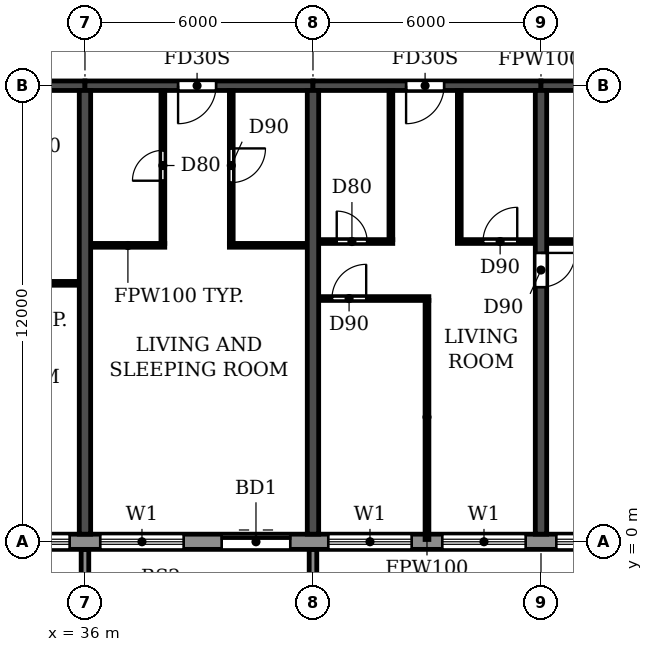
"""IFC4 building model, lengths in metres.
Left out: names, types, materials, properties, quantities, classifications, styles, units other than length and angle.
Written with IfcOpenShell. Run it as: python <this file> out.ifc"""

import sys

from ifc_helpers import new_model, si_unit, direction, frame, frame_2d, origin, place, context, subcontext, project, spatial, polyline, rectangle, outline, extrude, source, transform, mapped, element, fill, save


model = new_model("IFC4")
c1 = context("Model", 3, precision=1e-05, world=origin(), true_north=direction((0.0, 1.0)))
c2 = subcontext(c1, "Body", "Model", "MODEL_VIEW")
j1 = project(units=[si_unit("LENGTHUNIT", "METRE"), si_unit("PLANEANGLEUNIT", "RADIAN")], contexts=[c1])
p1 = place(None, origin())
s1 = spatial("IfcSite", under=j1, at=p1, CompositionType="ELEMENT")
p2 = place(p1, origin())
s2 = spatial("IfcBuilding", under=s1, at=p2, CompositionType="ELEMENT")
p3 = place(p2, frame((0.0, 0.0, 162.0)))
s3 = spatial("IfcBuildingStorey", under=s2, at=p3, CompositionType="ELEMENT", Elevation=162.0)
for number, where, z_axis, x_axis in (
    (1, (36.0, 0.2, 0.0), (0.0, 0.0, 1.0), (0.0, 1.0, 0.0)),
    (2, (42.0, 0.2, 0.0), (0.0, 0.0, 1.0), (0.0, 1.0, 0.0)),
):
    element("IfcWall", number, at=place(p3, frame(where, z_axis=z_axis, x_axis=x_axis)), inside=s3, PredefinedType="SHEAR", context=c2, shape_type="SweptSolid", body=[
        extrude(rectangle(XDim=11.675, YDim=0.3, at=frame_2d((5.837, 0.0))), origin(), (0.0, 0.0, 1.0), 2.95),
    ])
p4 = place(p3, frame((48.0, 0.2, 0.0), z_axis=(0.0, 0.0, 1.0), x_axis=(0.0, 1.0, 0.0)))
e3 = element("IfcWall", 3, at=p4, inside=s3, PredefinedType="SHEAR", context=c2, shape_type="SweptSolid", body=[
    extrude(rectangle(XDim=11.675, YDim=0.3, at=frame_2d((5.837, 0.0))), origin(), (0.0, 0.0, 1.0), 2.95),
])
p5 = place(p4, frame((6.5, 0.0, 0.0)))
e4 = element("IfcOpeningElement", 4, at=p5, cuts=e3, PredefinedType="OPENING", context=c2, shape_type="SweptSolid", body=[
    extrude(rectangle(XDim=0.9, YDim=2.1, at=frame_2d((0.45, 1.05))), frame((0.0, 0.16, 0.0), z_axis=(0.0, -1.0, 0.0), x_axis=(1.0, 0.0, 0.0)), (0.0, 0.0, 1.0), 0.32),
])
p6 = place(p3, frame((30.0, 12.0, 0.0), z_axis=(0.0, 0.0, 1.0), x_axis=(1.0, 0.0, 0.0)))
e5 = element("IfcWall", 5, at=p6, inside=s3, PredefinedType="SHEAR", context=c2, shape_type="SweptSolid", body=[
    extrude(rectangle(XDim=6.0, YDim=0.25, at=frame_2d((3.0, 0.0))), origin(), (0.0, 0.0, 1.0), 2.35),
])
p7 = place(p6, frame((2.45, 0.0, 0.0)))
e6 = element("IfcOpeningElement", 6, at=p7, cuts=e5, PredefinedType="OPENING", context=c2, shape_type="SweptSolid", body=[
    extrude(rectangle(XDim=1.0, YDim=2.1, at=frame_2d((0.5, 1.05))), frame((0.0, 0.135, 0.0), z_axis=(0.0, -1.0, 0.0), x_axis=(1.0, 0.0, 0.0)), (0.0, 0.0, 1.0), 0.27),
])
p8 = place(p3, frame((36.0, 12.0, 0.0), z_axis=(0.0, 0.0, 1.0), x_axis=(1.0, 0.0, 0.0)))
e7 = element("IfcWall", 7, at=p8, inside=s3, PredefinedType="SHEAR", context=c2, shape_type="SweptSolid", body=[
    extrude(rectangle(XDim=6.0, YDim=0.25, at=frame_2d((3.0, 0.0))), origin(), (0.0, 0.0, 1.0), 2.35),
])
p9 = place(p8, frame((2.45, 0.0, 0.0)))
e8 = element("IfcOpeningElement", 8, at=p9, cuts=e7, PredefinedType="OPENING", context=c2, shape_type="SweptSolid", body=[
    extrude(rectangle(XDim=1.0, YDim=2.1, at=frame_2d((0.5, 1.05))), frame((0.0, 0.135, 0.0), z_axis=(0.0, -1.0, 0.0), x_axis=(1.0, 0.0, 0.0)), (0.0, 0.0, 1.0), 0.27),
])
p10 = place(p3, frame((42.0, 12.0, 0.0), z_axis=(0.0, 0.0, 1.0), x_axis=(1.0, 0.0, 0.0)))
e9 = element("IfcWall", 9, at=p10, inside=s3, PredefinedType="SHEAR", context=c2, shape_type="SweptSolid", body=[
    extrude(rectangle(XDim=6.0, YDim=0.25, at=frame_2d((3.0, 0.0))), origin(), (0.0, 0.0, 1.0), 2.35),
])
p11 = place(p10, frame((2.45, 0.0, 0.0)))
e10 = element("IfcOpeningElement", 10, at=p11, cuts=e9, PredefinedType="OPENING", context=c2, shape_type="SweptSolid", body=[
    extrude(rectangle(XDim=1.0, YDim=2.1, at=frame_2d((0.5, 1.05))), frame((0.0, 0.135, 0.0), z_axis=(0.0, -1.0, 0.0), x_axis=(1.0, 0.0, 0.0)), (0.0, 0.0, 1.0), 0.27),
])
p12 = place(p3, frame((48.0, 12.0, 0.0), z_axis=(0.0, 0.0, 1.0), x_axis=(1.0, 0.0, 0.0)))
e11 = element("IfcWall", 11, at=p12, inside=s3, PredefinedType="SHEAR", context=c2, shape_type="SweptSolid", body=[
    extrude(rectangle(XDim=6.0, YDim=0.25, at=frame_2d((3.0, 0.0))), origin(), (0.0, 0.0, 1.0), 2.35),
])
p13 = place(p3, frame((22.683, 0.0, 0.0), z_axis=(0.0, 0.0, 1.0), x_axis=(1.0, 0.0, 0.0)))
e12 = element("IfcWall", 12, at=p13, inside=s3, PredefinedType="STANDARD", context=c2, shape_type="SweptSolid", body=[
    extrude(rectangle(XDim=56.634, YDim=0.4, at=frame_2d((28.317, 0.0))), origin(), (0.0, 0.0, 1.0), 2.95),
])
p14 = place(p13, frame((1.717, 0.0, 0.9)))
e13 = element("IfcOpeningElement", 13, at=p14, cuts=e12, PredefinedType="OPENING", context=c2, shape_type="SweptSolid", body=[
    extrude(rectangle(XDim=2.2, YDim=1.5, at=frame_2d((1.1, 0.75))), frame((0.0, 0.21, 0.0), z_axis=(0.0, -1.0, 0.0), x_axis=(1.0, 0.0, 0.0)), (0.0, 0.0, 1.0), 0.42),
])
p15 = place(p13, frame((4.917, 0.0, 0.0)))
e14 = element("IfcOpeningElement", 14, at=p15, cuts=e12, PredefinedType="OPENING", context=c2, shape_type="SweptSolid", body=[
    extrude(rectangle(XDim=1.8, YDim=2.4, at=frame_2d((0.9, 1.2))), frame((0.0, 0.21, 0.0), z_axis=(0.0, -1.0, 0.0), x_axis=(1.0, 0.0, 0.0)), (0.0, 0.0, 1.0), 0.42),
])
p16 = place(p13, frame((7.717, 0.0, 0.9)))
e15 = element("IfcOpeningElement", 15, at=p16, cuts=e12, PredefinedType="OPENING", context=c2, shape_type="SweptSolid", body=[
    extrude(rectangle(XDim=2.2, YDim=1.5, at=frame_2d((1.1, 0.75))), frame((0.0, 0.21, 0.0), z_axis=(0.0, -1.0, 0.0), x_axis=(1.0, 0.0, 0.0)), (0.0, 0.0, 1.0), 0.42),
])
p17 = place(p13, frame((10.717, 0.0, 0.9)))
e16 = element("IfcOpeningElement", 16, at=p17, cuts=e12, PredefinedType="OPENING", context=c2, shape_type="SweptSolid", body=[
    extrude(rectangle(XDim=2.2, YDim=1.5, at=frame_2d((1.1, 0.75))), frame((0.0, 0.21, 0.0), z_axis=(0.0, -1.0, 0.0), x_axis=(1.0, 0.0, 0.0)), (0.0, 0.0, 1.0), 0.42),
])
p18 = place(p13, frame((13.717, 0.0, 0.9)))
e17 = element("IfcOpeningElement", 17, at=p18, cuts=e12, PredefinedType="OPENING", context=c2, shape_type="SweptSolid", body=[
    extrude(rectangle(XDim=2.2, YDim=1.5, at=frame_2d((1.1, 0.75))), frame((0.0, 0.21, 0.0), z_axis=(0.0, -1.0, 0.0), x_axis=(1.0, 0.0, 0.0)), (0.0, 0.0, 1.0), 0.42),
])
p19 = place(p13, frame((16.917, 0.0, 0.0)))
e18 = element("IfcOpeningElement", 18, at=p19, cuts=e12, PredefinedType="OPENING", context=c2, shape_type="SweptSolid", body=[
    extrude(rectangle(XDim=1.8, YDim=2.4, at=frame_2d((0.9, 1.2))), frame((0.0, 0.21, 0.0), z_axis=(0.0, -1.0, 0.0), x_axis=(1.0, 0.0, 0.0)), (0.0, 0.0, 1.0), 0.42),
])
p20 = place(p13, frame((19.717, 0.0, 0.9)))
e19 = element("IfcOpeningElement", 19, at=p20, cuts=e12, PredefinedType="OPENING", context=c2, shape_type="SweptSolid", body=[
    extrude(rectangle(XDim=2.2, YDim=1.5, at=frame_2d((1.1, 0.75))), frame((0.0, 0.21, 0.0), z_axis=(0.0, -1.0, 0.0), x_axis=(1.0, 0.0, 0.0)), (0.0, 0.0, 1.0), 0.42),
])
p21 = place(p13, frame((22.717, 0.0, 0.9)))
e20 = element("IfcOpeningElement", 20, at=p21, cuts=e12, PredefinedType="OPENING", context=c2, shape_type="SweptSolid", body=[
    extrude(rectangle(XDim=2.2, YDim=1.5, at=frame_2d((1.1, 0.75))), frame((0.0, 0.21, 0.0), z_axis=(0.0, -1.0, 0.0), x_axis=(1.0, 0.0, 0.0)), (0.0, 0.0, 1.0), 0.42),
])
p22 = place(p13, frame((25.717, 0.0, 0.9)))
e21 = element("IfcOpeningElement", 21, at=p22, cuts=e12, PredefinedType="OPENING", context=c2, shape_type="SweptSolid", body=[
    extrude(rectangle(XDim=2.2, YDim=1.5, at=frame_2d((1.1, 0.75))), frame((0.0, 0.21, 0.0), z_axis=(0.0, -1.0, 0.0), x_axis=(1.0, 0.0, 0.0)), (0.0, 0.0, 1.0), 0.42),
])
p23 = place(p13, frame((28.717, 0.0, 0.9)))
e22 = element("IfcOpeningElement", 22, at=p23, cuts=e12, PredefinedType="OPENING", context=c2, shape_type="SweptSolid", body=[
    extrude(rectangle(XDim=2.2, YDim=1.5, at=frame_2d((1.1, 0.75))), frame((0.0, 0.21, 0.0), z_axis=(0.0, -1.0, 0.0), x_axis=(1.0, 0.0, 0.0)), (0.0, 0.0, 1.0), 0.42),
])
p24 = place(p13, frame((31.717, 0.0, 0.9)))
e23 = element("IfcOpeningElement", 23, at=p24, cuts=e12, PredefinedType="OPENING", context=c2, shape_type="SweptSolid", body=[
    extrude(rectangle(XDim=2.2, YDim=1.5, at=frame_2d((1.1, 0.75))), frame((0.0, 0.21, 0.0), z_axis=(0.0, -1.0, 0.0), x_axis=(1.0, 0.0, 0.0)), (0.0, 0.0, 1.0), 0.42),
])
p25 = place(p13, frame((34.717, 0.0, 0.9)))
e24 = element("IfcOpeningElement", 24, at=p25, cuts=e12, PredefinedType="OPENING", context=c2, shape_type="SweptSolid", body=[
    extrude(rectangle(XDim=2.2, YDim=1.5, at=frame_2d((1.1, 0.75))), frame((0.0, 0.21, 0.0), z_axis=(0.0, -1.0, 0.0), x_axis=(1.0, 0.0, 0.0)), (0.0, 0.0, 1.0), 0.42),
])
p26 = place(p13, frame((37.717, 0.0, 0.9)))
e25 = element("IfcOpeningElement", 25, at=p26, cuts=e12, PredefinedType="OPENING", context=c2, shape_type="SweptSolid", body=[
    extrude(rectangle(XDim=2.2, YDim=1.5, at=frame_2d((1.1, 0.75))), frame((0.0, 0.21, 0.0), z_axis=(0.0, -1.0, 0.0), x_axis=(1.0, 0.0, 0.0)), (0.0, 0.0, 1.0), 0.42),
])
p27 = place(p13, frame((40.717, 0.0, 0.9)))
e26 = element("IfcOpeningElement", 26, at=p27, cuts=e12, PredefinedType="OPENING", context=c2, shape_type="SweptSolid", body=[
    extrude(rectangle(XDim=2.2, YDim=1.5, at=frame_2d((1.1, 0.75))), frame((0.0, 0.21, 0.0), z_axis=(0.0, -1.0, 0.0), x_axis=(1.0, 0.0, 0.0)), (0.0, 0.0, 1.0), 0.42),
])
p28 = place(p13, frame((43.717, 0.0, 0.9)))
e27 = element("IfcOpeningElement", 27, at=p28, cuts=e12, PredefinedType="OPENING", context=c2, shape_type="SweptSolid", body=[
    extrude(rectangle(XDim=2.2, YDim=1.5, at=frame_2d((1.1, 0.75))), frame((0.0, 0.21, 0.0), z_axis=(0.0, -1.0, 0.0), x_axis=(1.0, 0.0, 0.0)), (0.0, 0.0, 1.0), 0.42),
])
p29 = place(p13, frame((46.717, 0.0, 0.9)))
e28 = element("IfcOpeningElement", 28, at=p29, cuts=e12, PredefinedType="OPENING", context=c2, shape_type="SweptSolid", body=[
    extrude(rectangle(XDim=2.2, YDim=1.5, at=frame_2d((1.1, 0.75))), frame((0.0, 0.21, 0.0), z_axis=(0.0, -1.0, 0.0), x_axis=(1.0, 0.0, 0.0)), (0.0, 0.0, 1.0), 0.42),
])
p30 = place(p13, frame((49.917, 0.0, 0.0)))
e29 = element("IfcOpeningElement", 29, at=p30, cuts=e12, PredefinedType="OPENING", context=c2, shape_type="SweptSolid", body=[
    extrude(rectangle(XDim=1.8, YDim=2.4, at=frame_2d((0.9, 1.2))), frame((0.0, 0.21, 0.0), z_axis=(0.0, -1.0, 0.0), x_axis=(1.0, 0.0, 0.0)), (0.0, 0.0, 1.0), 0.42),
])
p31 = place(p13, frame((52.717, 0.0, 0.9)))
e30 = element("IfcOpeningElement", 30, at=p31, cuts=e12, PredefinedType="OPENING", context=c2, shape_type="SweptSolid", body=[
    extrude(rectangle(XDim=2.2, YDim=1.5, at=frame_2d((1.1, 0.75))), frame((0.0, 0.21, 0.0), z_axis=(0.0, -1.0, 0.0), x_axis=(1.0, 0.0, 0.0)), (0.0, 0.0, 1.0), 0.42),
])
m1 = source(origin(), c2, "Body", "SweptSolid", [
    extrude(outline(polyline([(0.0, 0.0), (0.2, 0.0), (0.2, 1.65), (0.0, 1.65), (0.0, 0.0)])), origin(), (0.0, 0.0, 1.0), 3.1),
])
for number, where in (
    (31, (35.9, -1.85, 0.0)),
    (32, (41.9, -1.85, 0.0)),
):
    element("IfcWall", number, at=place(p3, frame(where)), inside=s3, PredefinedType="STANDARD", context=c2, shape_type="MappedRepresentation", body=[
        mapped(m1, transform((0.0, 0.0, 0.0))),
    ])
p32 = place(p3, frame((42.16, 6.4, 0.0), z_axis=(0.0, 0.0, 1.0), x_axis=(1.0, 0.0, 0.0)))
e33 = element("IfcWall", 33, at=p32, inside=s3, PredefinedType="PARTITIONING", context=c2, shape_type="SweptSolid", body=[
    extrude(rectangle(XDim=2.89, YDim=0.1, at=frame_2d((1.445, 0.0))), origin(), (0.0, 0.0, 1.0), 2.95),
])
p33 = place(p32, frame((0.34, 0.0, 0.0)))
e34 = element("IfcOpeningElement", 34, at=p33, cuts=e33, PredefinedType="OPENING", context=c2, shape_type="SweptSolid", body=[
    extrude(rectangle(XDim=0.9, YDim=2.1, at=frame_2d((0.45, 1.05))), frame((0.0, 0.06, 0.0), z_axis=(0.0, -1.0, 0.0), x_axis=(1.0, 0.0, 0.0)), (0.0, 0.0, 1.0), 0.12),
])
p34 = place(p3, frame((33.8, 6.8, 0.0), z_axis=(0.0, 0.0, 1.0), x_axis=(1.0, 0.0, 0.0)))
e35 = element("IfcWall", 35, at=p34, inside=s3, PredefinedType="PARTITIONING", context=c2, shape_type="SweptSolid", body=[
    extrude(rectangle(XDim=2.04, YDim=0.1, at=frame_2d((1.02, 0.0))), origin(), (0.0, 0.0, 1.0), 2.95),
])
p35 = place(p3, frame((36.16, 7.8, 0.0), z_axis=(0.0, 0.0, 1.0), x_axis=(1.0, 0.0, 0.0)))
e36 = element("IfcWall", 36, at=p35, inside=s3, PredefinedType="PARTITIONING", context=c2, shape_type="SweptSolid", body=[
    extrude(rectangle(XDim=1.94, YDim=0.1, at=frame_2d((0.97, 0.0))), origin(), (0.0, 0.0, 1.0), 2.95),
])
p36 = place(p3, frame((39.8, 7.8, 0.0), z_axis=(0.0, 0.0, 1.0), x_axis=(1.0, 0.0, 0.0)))
e37 = element("IfcWall", 37, at=p36, inside=s3, PredefinedType="PARTITIONING", context=c2, shape_type="SweptSolid", body=[
    extrude(rectangle(XDim=2.04, YDim=0.1, at=frame_2d((1.02, 0.0))), origin(), (0.0, 0.0, 1.0), 2.95),
])
p37 = place(p3, frame((42.16, 7.9, 0.0), z_axis=(0.0, 0.0, 1.0), x_axis=(1.0, 0.0, 0.0)))
e38 = element("IfcWall", 38, at=p37, inside=s3, PredefinedType="PARTITIONING", context=c2, shape_type="SweptSolid", body=[
    extrude(rectangle(XDim=1.94, YDim=0.1, at=frame_2d((0.97, 0.0))), origin(), (0.0, 0.0, 1.0), 2.95),
])
p38 = place(p37, frame((0.465, 0.0, 0.0)))
e39 = element("IfcOpeningElement", 39, at=p38, cuts=e38, PredefinedType="OPENING", context=c2, shape_type="SweptSolid", body=[
    extrude(rectangle(XDim=0.8, YDim=2.1, at=frame_2d((0.4, 1.05))), frame((0.0, 0.06, 0.0), z_axis=(0.0, -1.0, 0.0), x_axis=(1.0, 0.0, 0.0)), (0.0, 0.0, 1.0), 0.12),
])
p39 = place(p3, frame((45.8, 7.9, 0.0), z_axis=(0.0, 0.0, 1.0), x_axis=(1.0, 0.0, 0.0)))
e40 = element("IfcWall", 40, at=p39, inside=s3, PredefinedType="PARTITIONING", context=c2, shape_type="SweptSolid", body=[
    extrude(rectangle(XDim=2.04, YDim=0.1, at=frame_2d((1.02, 0.0))), origin(), (0.0, 0.0, 1.0), 2.95),
])
p40 = place(p39, frame((0.675, 0.0, 0.0)))
e41 = element("IfcOpeningElement", 41, at=p40, cuts=e40, PredefinedType="OPENING", context=c2, shape_type="SweptSolid", body=[
    extrude(rectangle(XDim=0.9, YDim=2.1, at=frame_2d((0.45, 1.05))), frame((0.0, 0.06, 0.0), z_axis=(0.0, -1.0, 0.0), x_axis=(1.0, 0.0, 0.0)), (0.0, 0.0, 1.0), 0.12),
])
p41 = place(p3, frame((48.16, 7.9, 0.0), z_axis=(0.0, 0.0, 1.0), x_axis=(1.0, 0.0, 0.0)))
e42 = element("IfcWall", 42, at=p41, inside=s3, PredefinedType="PARTITIONING", context=c2, shape_type="SweptSolid", body=[
    extrude(rectangle(XDim=2.74, YDim=0.1, at=frame_2d((1.37, 0.0))), origin(), (0.0, 0.0, 1.0), 2.95),
])
p42 = place(p41, frame((0.94, 0.0, 0.0)))
e43 = element("IfcOpeningElement", 43, at=p42, cuts=e42, PredefinedType="OPENING", context=c2, shape_type="SweptSolid", body=[
    extrude(rectangle(XDim=0.8, YDim=2.1, at=frame_2d((0.4, 1.05))), frame((0.0, 0.06, 0.0), z_axis=(0.0, -1.0, 0.0), x_axis=(1.0, 0.0, 0.0)), (0.0, 0.0, 1.0), 0.12),
])
p43 = place(p3, frame((38.05, 7.85, 0.0), z_axis=(0.0, 0.0, 1.0), x_axis=(0.0, 1.0, 0.0)))
e44 = element("IfcWall", 44, at=p43, inside=s3, PredefinedType="PARTITIONING", context=c2, shape_type="SweptSolid", body=[
    extrude(rectangle(XDim=4.015, YDim=0.1, at=frame_2d((2.007, 0.0))), origin(), (0.0, 0.0, 1.0), 2.95),
])
p44 = place(p43, frame((1.65, 0.0, 0.0)))
e45 = element("IfcOpeningElement", 45, at=p44, cuts=e44, PredefinedType="OPENING", context=c2, shape_type="SweptSolid", body=[
    extrude(rectangle(XDim=0.8, YDim=2.1, at=frame_2d((0.4, 1.05))), frame((0.0, 0.06, 0.0), z_axis=(0.0, -1.0, 0.0), x_axis=(1.0, 0.0, 0.0)), (0.0, 0.0, 1.0), 0.12),
])
p45 = place(p3, frame((39.85, 7.85, 0.0), z_axis=(0.0, 0.0, 1.0), x_axis=(0.0, 1.0, 0.0)))
e46 = element("IfcWall", 46, at=p45, inside=s3, PredefinedType="PARTITIONING", context=c2, shape_type="SweptSolid", body=[
    extrude(rectangle(XDim=4.015, YDim=0.1, at=frame_2d((2.007, 0.0))), origin(), (0.0, 0.0, 1.0), 2.95),
])
p46 = place(p45, frame((1.6, 0.0, 0.0)))
e47 = element("IfcOpeningElement", 47, at=p46, cuts=e46, PredefinedType="OPENING", context=c2, shape_type="SweptSolid", body=[
    extrude(rectangle(XDim=0.9, YDim=2.1, at=frame_2d((0.45, 1.05))), frame((0.0, 0.06, 0.0), z_axis=(0.0, -1.0, 0.0), x_axis=(1.0, 0.0, 0.0)), (0.0, 0.0, 1.0), 0.12),
])
p47 = place(p3, frame((44.05, 7.95, 0.0), z_axis=(0.0, 0.0, 1.0), x_axis=(0.0, 1.0, 0.0)))
e48 = element("IfcWall", 48, at=p47, inside=s3, PredefinedType="PARTITIONING", context=c2, shape_type="SweptSolid", body=[
    extrude(rectangle(XDim=3.915, YDim=0.1, at=frame_2d((1.958, 0.0))), origin(), (0.0, 0.0, 1.0), 2.95),
])
p48 = place(p3, frame((45.0, 0.06, 0.0), z_axis=(0.0, 0.0, 1.0), x_axis=(0.0, 1.0, 0.0)))
e49 = element("IfcWall", 49, at=p48, inside=s3, PredefinedType="PARTITIONING", context=c2, shape_type="SweptSolid", body=[
    extrude(rectangle(XDim=6.29, YDim=0.1, at=frame_2d((3.145, 0.0))), origin(), (0.0, 0.0, 1.0), 2.95),
])
p49 = place(p3, frame((45.85, 7.95, 0.0), z_axis=(0.0, 0.0, 1.0), x_axis=(0.0, 1.0, 0.0)))
e50 = element("IfcWall", 50, at=p49, inside=s3, PredefinedType="PARTITIONING", context=c2, shape_type="SweptSolid", body=[
    extrude(rectangle(XDim=3.915, YDim=0.1, at=frame_2d((1.958, 0.0))), origin(), (0.0, 0.0, 1.0), 2.95),
])
p50 = place(p17, origin())
e51 = element("IfcWindow", 51, at=p50, inside=s3, PartitioningType="DOUBLE_PANEL_HORIZONTAL", PredefinedType="WINDOW", context=c2, shape_type="SweptSolid", body=[
    extrude(rectangle(XDim=2.2, YDim=1.5, at=frame_2d((1.1, 0.75))), frame((0.0, 0.03, 0.0), z_axis=(0.0, -1.0, 0.0), x_axis=(1.0, 0.0, 0.0)), (0.0, 0.0, 1.0), 0.06),
])
fill(e16, e51)
p51 = place(p18, origin())
e52 = element("IfcWindow", 52, at=p51, inside=s3, PartitioningType="DOUBLE_PANEL_HORIZONTAL", PredefinedType="WINDOW", context=c2, shape_type="SweptSolid", body=[
    extrude(rectangle(XDim=2.2, YDim=1.5, at=frame_2d((1.1, 0.75))), frame((0.0, 0.03, 0.0), z_axis=(0.0, -1.0, 0.0), x_axis=(1.0, 0.0, 0.0)), (0.0, 0.0, 1.0), 0.06),
])
fill(e17, e52)
p52 = place(p19, origin())
e53 = element("IfcDoor", 53, at=p52, inside=s3, OperationType="DOUBLE_DOOR_SLIDING", PredefinedType="DOOR", context=c2, shape_type="SweptSolid", body=[
    extrude(rectangle(XDim=1.8, YDim=2.4, at=frame_2d((0.9, 1.2))), frame((0.0, 0.025, 0.0), z_axis=(0.0, -1.0, 0.0), x_axis=(1.0, 0.0, 0.0)), (0.0, 0.0, 1.0), 0.05),
])
fill(e18, e53)
p53 = place(p20, origin())
e54 = element("IfcWindow", 54, at=p53, inside=s3, PartitioningType="DOUBLE_PANEL_HORIZONTAL", PredefinedType="WINDOW", context=c2, shape_type="SweptSolid", body=[
    extrude(rectangle(XDim=2.2, YDim=1.5, at=frame_2d((1.1, 0.75))), frame((0.0, 0.03, 0.0), z_axis=(0.0, -1.0, 0.0), x_axis=(1.0, 0.0, 0.0)), (0.0, 0.0, 1.0), 0.06),
])
fill(e19, e54)
p54 = place(p21, origin())
e55 = element("IfcWindow", 55, at=p54, inside=s3, PartitioningType="DOUBLE_PANEL_HORIZONTAL", PredefinedType="WINDOW", context=c2, shape_type="SweptSolid", body=[
    extrude(rectangle(XDim=2.2, YDim=1.5, at=frame_2d((1.1, 0.75))), frame((0.0, 0.03, 0.0), z_axis=(0.0, -1.0, 0.0), x_axis=(1.0, 0.0, 0.0)), (0.0, 0.0, 1.0), 0.06),
])
fill(e20, e55)
p55 = place(p22, origin())
e56 = element("IfcWindow", 56, at=p55, inside=s3, PartitioningType="DOUBLE_PANEL_HORIZONTAL", PredefinedType="WINDOW", context=c2, shape_type="SweptSolid", body=[
    extrude(rectangle(XDim=2.2, YDim=1.5, at=frame_2d((1.1, 0.75))), frame((0.0, 0.03, 0.0), z_axis=(0.0, -1.0, 0.0), x_axis=(1.0, 0.0, 0.0)), (0.0, 0.0, 1.0), 0.06),
])
fill(e21, e56)
p56 = place(p44, origin())
e57 = element("IfcDoor", 57, at=p56, inside=s3, OperationType="SINGLE_SWING_LEFT", PredefinedType="DOOR", context=c2, shape_type="SweptSolid", body=[
    extrude(rectangle(XDim=0.8, YDim=2.1, at=frame_2d((0.4, 1.05))), frame((0.0, 0.025, 0.0), z_axis=(0.0, -1.0, 0.0), x_axis=(1.0, 0.0, 0.0)), (0.0, 0.0, 1.0), 0.05),
])
fill(e45, e57)
p57 = place(p9, frame((1.0, 0.0, 0.0), z_axis=(0.0, 0.0, 1.0), x_axis=(-1.0, 0.0, 0.0)))
e58 = element("IfcDoor", 58, at=p57, inside=s3, OperationType="SINGLE_SWING_RIGHT", PredefinedType="DOOR", context=c2, shape_type="SweptSolid", body=[
    extrude(rectangle(XDim=1.0, YDim=2.1, at=frame_2d((0.5, 1.05))), frame((0.0, 0.025, 0.0), z_axis=(0.0, -1.0, 0.0), x_axis=(1.0, 0.0, 0.0)), (0.0, 0.0, 1.0), 0.05),
])
fill(e8, e58)
p58 = place(p46, frame((0.9, 0.0, 0.0), z_axis=(0.0, 0.0, 1.0), x_axis=(-1.0, 0.0, 0.0)))
e59 = element("IfcDoor", 59, at=p58, inside=s3, OperationType="SINGLE_SWING_LEFT", PredefinedType="DOOR", context=c2, shape_type="SweptSolid", body=[
    extrude(rectangle(XDim=0.9, YDim=2.1, at=frame_2d((0.45, 1.05))), frame((0.0, 0.025, 0.0), z_axis=(0.0, -1.0, 0.0), x_axis=(1.0, 0.0, 0.0)), (0.0, 0.0, 1.0), 0.05),
])
fill(e47, e59)
p59 = place(p33, origin())
e60 = element("IfcDoor", 60, at=p59, inside=s3, OperationType="SINGLE_SWING_RIGHT", PredefinedType="DOOR", context=c2, shape_type="SweptSolid", body=[
    extrude(rectangle(XDim=0.9, YDim=2.1, at=frame_2d((0.45, 1.05))), frame((0.0, 0.025, 0.0), z_axis=(0.0, -1.0, 0.0), x_axis=(1.0, 0.0, 0.0)), (0.0, 0.0, 1.0), 0.05),
])
fill(e34, e60)
p60 = place(p38, origin())
e61 = element("IfcDoor", 61, at=p60, inside=s3, OperationType="SINGLE_SWING_LEFT", PredefinedType="DOOR", context=c2, shape_type="SweptSolid", body=[
    extrude(rectangle(XDim=0.8, YDim=2.1, at=frame_2d((0.4, 1.05))), frame((0.0, 0.025, 0.0), z_axis=(0.0, -1.0, 0.0), x_axis=(1.0, 0.0, 0.0)), (0.0, 0.0, 1.0), 0.05),
])
fill(e39, e61)
p61 = place(p11, frame((1.0, 0.0, 0.0), z_axis=(0.0, 0.0, 1.0), x_axis=(-1.0, 0.0, 0.0)))
e62 = element("IfcDoor", 62, at=p61, inside=s3, OperationType="SINGLE_SWING_RIGHT", PredefinedType="DOOR", context=c2, shape_type="SweptSolid", body=[
    extrude(rectangle(XDim=1.0, YDim=2.1, at=frame_2d((0.5, 1.05))), frame((0.0, 0.025, 0.0), z_axis=(0.0, -1.0, 0.0), x_axis=(1.0, 0.0, 0.0)), (0.0, 0.0, 1.0), 0.05),
])
fill(e10, e62)
p62 = place(p40, origin())
e63 = element("IfcDoor", 63, at=p62, inside=s3, OperationType="SINGLE_SWING_RIGHT", PredefinedType="DOOR", context=c2, shape_type="SweptSolid", body=[
    extrude(rectangle(XDim=0.9, YDim=2.1, at=frame_2d((0.45, 1.05))), frame((0.0, 0.025, 0.0), z_axis=(0.0, -1.0, 0.0), x_axis=(1.0, 0.0, 0.0)), (0.0, 0.0, 1.0), 0.05),
])
fill(e41, e63)
p63 = place(p5, frame((0.9, 0.0, 0.0), z_axis=(0.0, 0.0, 1.0), x_axis=(-1.0, 0.0, 0.0)))
e64 = element("IfcDoor", 64, at=p63, inside=s3, OperationType="SINGLE_SWING_LEFT", PredefinedType="DOOR", context=c2, shape_type="SweptSolid", body=[
    extrude(rectangle(XDim=0.9, YDim=2.1, at=frame_2d((0.45, 1.05))), frame((0.0, 0.025, 0.0), z_axis=(0.0, -1.0, 0.0), x_axis=(1.0, 0.0, 0.0)), (0.0, 0.0, 1.0), 0.05),
])
fill(e4, e64)
save(model, sys.argv[1])
